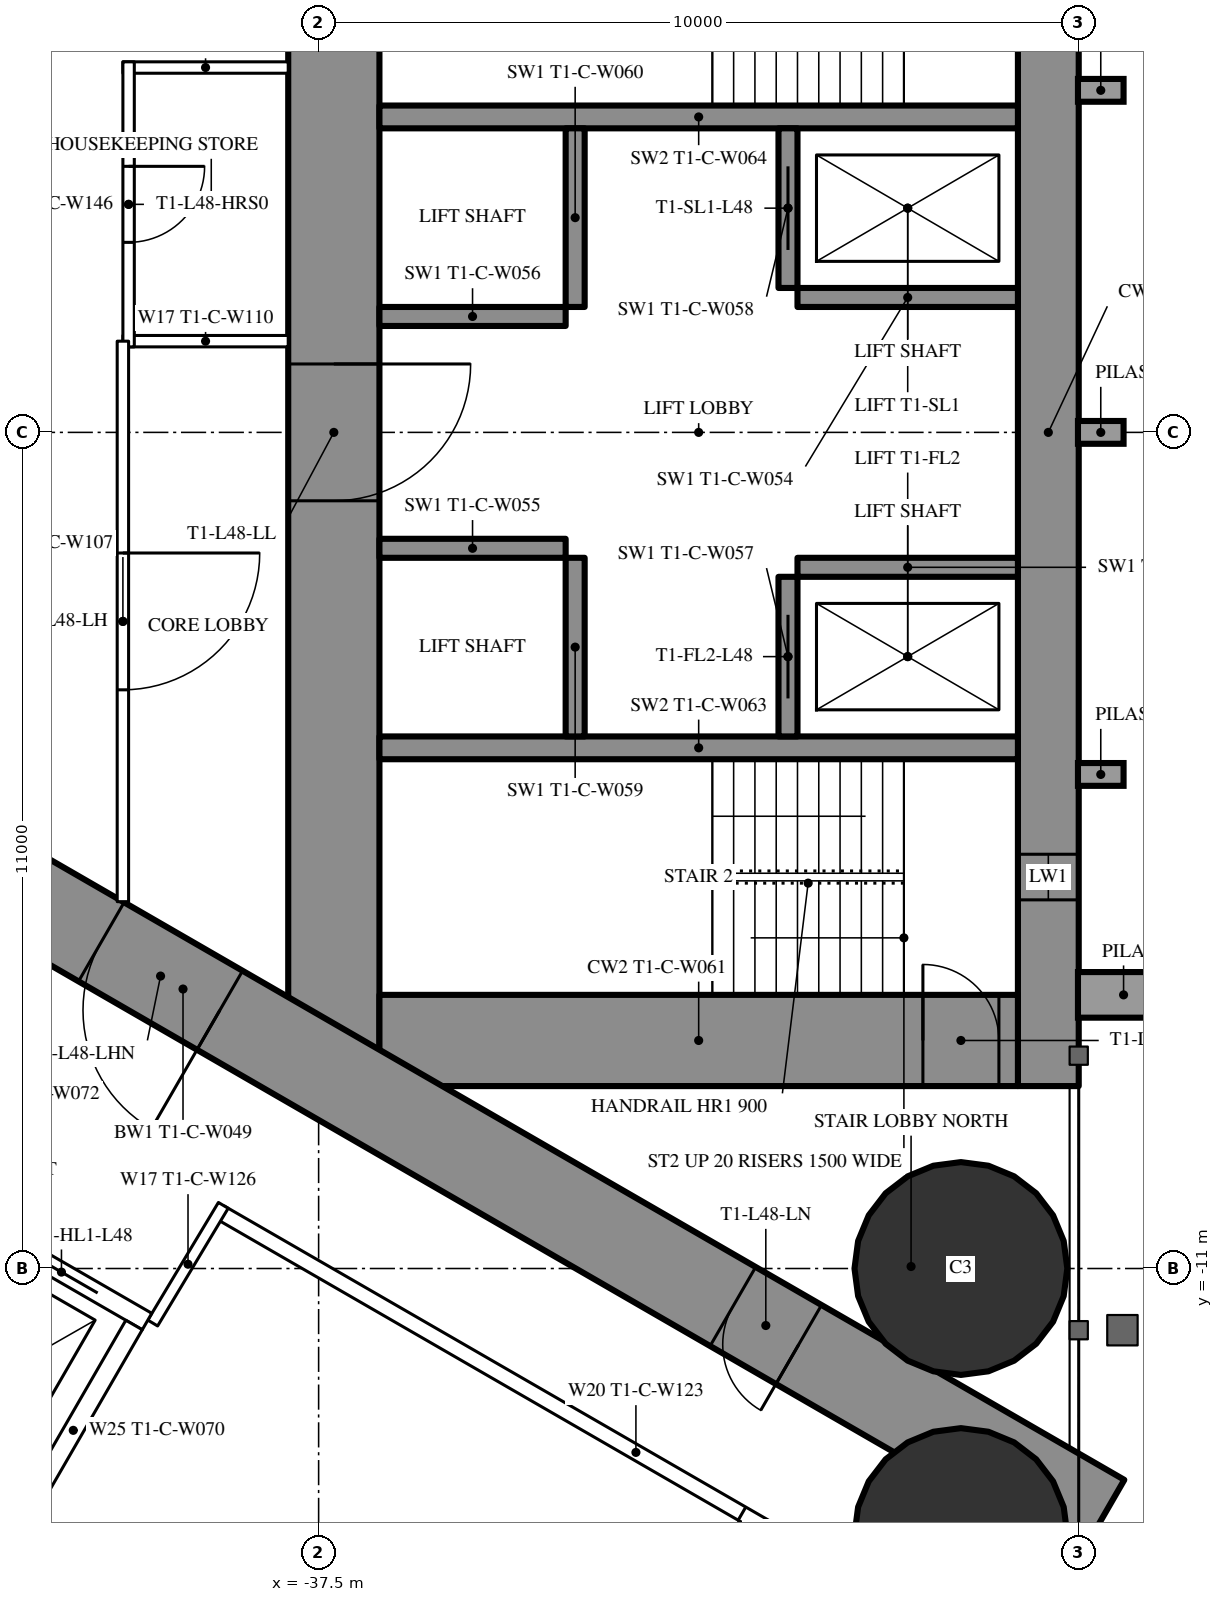
"""IFC4 building model, lengths in metres.
Left out: names, types, materials, properties, quantities, classifications, styles, units other than length and angle.
Written with IfcOpenShell. Run it as: python <this file> out.ifc"""

import sys

from ifc_helpers import new_model, si_unit, direction, frame, frame_2d, origin, origin_2d, place, context, subcontext, project, spatial, rectangle, circle, extrude, element, fill, save


model = new_model("IFC4")
c1 = context("Model", 3, precision=1e-05, world=origin(), true_north=direction((0.0, 1.0)))
c2 = subcontext(c1, "Body", "Model", "MODEL_VIEW")
j1 = project(units=[si_unit("LENGTHUNIT", "METRE"), si_unit("PLANEANGLEUNIT", "RADIAN")], contexts=[c1])
p1 = place(None, origin())
s1 = spatial("IfcSite", under=j1, at=p1, CompositionType="ELEMENT")
p2 = place(p1, origin())
s2 = spatial("IfcBuilding", under=s1, at=p2, CompositionType="ELEMENT")
p3 = place(p2, frame((0.0, 0.0, 180.8)))
s3 = spatial("IfcBuildingStorey", under=s2, at=p3, CompositionType="ELEMENT", Elevation=180.8)
for number, where, z_axis, x_axis in (
    (1, (-29.05, -11.0, 0.0), (0.0, 0.0, 1.0), (1.0, 0.0, 0.0)),
    (2, (-29.05, -14.5, 0.0), (0.0, 0.0, 1.0), (1.0, 0.0, 0.0)),
):
    element("IfcColumn", number, at=place(p3, frame(where, z_axis=z_axis, x_axis=x_axis)), inside=s3, PredefinedType="COLUMN", context=c2, shape_type="SweptSolid", body=[
        extrude(circle(Radius=1.4, at=origin_2d()), origin(), (0.0, 0.0, 1.0), 3.5),
    ])
p4 = place(p3, frame((-27.9, 8.6, 0.0), z_axis=(0.0, 0.0, 1.0), x_axis=(0.0, -1.0, 0.0)))
e3 = element("IfcWall", 3, at=p4, inside=s3, PredefinedType="SHEAR", context=c2, shape_type="SweptSolid", body=[
    extrude(rectangle(XDim=17.2, YDim=0.8, at=frame_2d((8.6, 0.0))), origin(), (0.0, 0.0, 1.0), 3.5),
])
p5 = place(p4, frame((2.45, 0.0, 0.6)))
e4 = element("IfcOpeningElement", 4, at=p5, cuts=e3, PredefinedType="OPENING", context=c2, shape_type="SweptSolid", body=[
    extrude(rectangle(XDim=0.6, YDim=2.1, at=frame_2d((0.3, 1.05))), frame((0.0, 0.41, 0.0), z_axis=(0.0, -1.0, 0.0), x_axis=(1.0, 0.0, 0.0)), (0.0, 0.0, 1.0), 0.82),
])
p6 = place(p4, frame((14.15, 0.0, 0.6)))
e5 = element("IfcOpeningElement", 5, at=p6, cuts=e3, PredefinedType="OPENING", context=c2, shape_type="SweptSolid", body=[
    extrude(rectangle(XDim=0.6, YDim=2.1, at=frame_2d((0.3, 1.05))), frame((0.0, 0.41, 0.0), z_axis=(0.0, -1.0, 0.0), x_axis=(1.0, 0.0, 0.0)), (0.0, 0.0, 1.0), 0.82),
])
p7 = place(p3, frame((-37.3, 8.6, 0.0), z_axis=(0.0, 0.0, 1.0), x_axis=(0.0, -1.0, 0.0)))
e6 = element("IfcWall", 6, at=p7, inside=s3, PredefinedType="SHEAR", context=c2, shape_type="SweptSolid", body=[
    extrude(rectangle(XDim=17.2, YDim=1.2, at=frame_2d((8.6, 0.0))), origin(), (0.0, 0.0, 1.0), 3.5),
])
p8 = place(p7, frame((7.7, 0.0, 0.0)))
e7 = element("IfcOpeningElement", 7, at=p8, cuts=e6, PredefinedType="OPENING", context=c2, shape_type="SweptSolid", body=[
    extrude(rectangle(XDim=1.8, YDim=2.2, at=frame_2d((0.9, 1.1))), frame((0.0, 0.61, 0.0), z_axis=(0.0, -1.0, 0.0), x_axis=(1.0, 0.0, 0.0)), (0.0, 0.0, 1.0), 1.22),
])
p9 = place(p3, frame((-28.3, -8.0, 0.0), z_axis=(0.0, 0.0, 1.0), x_axis=(-1.0, 0.0, 0.0)))
e8 = element("IfcWall", 8, at=p9, inside=s3, PredefinedType="SHEAR", context=c2, shape_type="SweptSolid", body=[
    extrude(rectangle(XDim=8.4, YDim=1.2, at=frame_2d((4.2, 0.0))), origin(), (0.0, 0.0, 1.0), 3.5),
])
p10 = place(p9, frame((0.25, 0.0, 0.0)))
e9 = element("IfcOpeningElement", 9, at=p10, cuts=e8, PredefinedType="OPENING", context=c2, shape_type="SweptSolid", body=[
    extrude(rectangle(XDim=1.0, YDim=2.2, at=frame_2d((0.5, 1.1))), frame((0.0, 0.61, 0.0), z_axis=(0.0, -1.0, 0.0), x_axis=(1.0, 0.0, 0.0)), (0.0, 0.0, 1.0), 1.22),
])
for number, where, z_axis, x_axis in (
    (10, (-28.3, 4.15, 0.0), (0.0, 0.0, 1.0), (-1.0, 0.0, 0.0)),
    (11, (-28.3, -4.15, 0.0), (0.0, 0.0, 1.0), (-1.0, 0.0, 0.0)),
):
    element("IfcWall", number, at=place(p3, frame(where, z_axis=z_axis, x_axis=x_axis)), inside=s3, PredefinedType="SHEAR", context=c2, shape_type="SweptSolid", body=[
        extrude(rectangle(XDim=8.4, YDim=0.3, at=frame_2d((4.2, 0.0))), origin(), (0.0, 0.0, 1.0), 3.5),
    ])
p11 = place(p3, frame((-31.325, 4.0, 0.0), z_axis=(0.0, 0.0, 1.0), x_axis=(0.0, -1.0, 0.0)))
e12 = element("IfcWall", 12, at=p11, inside=s3, PredefinedType="SHEAR", context=c2, shape_type="SweptSolid", body=[
    extrude(rectangle(XDim=2.1, YDim=0.25, at=frame_2d((1.05, 0.0))), origin(), (0.0, 0.0, 1.0), 3.5),
])
p12 = place(p11, frame((0.5, 0.0, 0.0)))
e13 = element("IfcOpeningElement", 13, at=p12, cuts=e12, PredefinedType="OPENING", context=c2, shape_type="SweptSolid", body=[
    extrude(rectangle(XDim=1.1, YDim=2.2, at=frame_2d((0.55, 1.1))), frame((0.0, 0.135, 0.0), z_axis=(0.0, -1.0, 0.0), x_axis=(1.0, 0.0, 0.0)), (0.0, 0.0, 1.0), 0.27),
])
p13 = place(p3, frame((-34.125, 4.0, 0.0), z_axis=(0.0, 0.0, 1.0), x_axis=(0.0, -1.0, 0.0)))
e14 = element("IfcWall", 14, at=p13, inside=s3, PredefinedType="SHEAR", context=c2, shape_type="SweptSolid", body=[
    extrude(rectangle(XDim=2.35, YDim=0.25, at=frame_2d((1.175, 0.0))), origin(), (0.0, 0.0, 1.0), 3.5),
])
p14 = place(p3, frame((-28.3, 1.775, 0.0), z_axis=(0.0, 0.0, 1.0), x_axis=(-1.0, 0.0, 0.0)))
e15 = element("IfcWall", 15, at=p14, inside=s3, PredefinedType="SHEAR", context=c2, shape_type="SweptSolid", body=[
    extrude(rectangle(XDim=2.9, YDim=0.25, at=frame_2d((1.45, 0.0))), origin(), (0.0, 0.0, 1.0), 3.5),
])
p15 = place(p3, frame((-34.25, 1.525, 0.0), z_axis=(0.0, 0.0, 1.0), x_axis=(-1.0, 0.0, 0.0)))
e16 = element("IfcWall", 16, at=p15, inside=s3, PredefinedType="SHEAR", context=c2, shape_type="SweptSolid", body=[
    extrude(rectangle(XDim=2.45, YDim=0.25, at=frame_2d((1.225, 0.0))), origin(), (0.0, 0.0, 1.0), 3.5),
])
p16 = place(p3, frame((-31.325, -1.9, 0.0), z_axis=(0.0, 0.0, 1.0), x_axis=(0.0, -1.0, 0.0)))
e17 = element("IfcWall", 17, at=p16, inside=s3, PredefinedType="SHEAR", context=c2, shape_type="SweptSolid", body=[
    extrude(rectangle(XDim=2.1, YDim=0.25, at=frame_2d((1.05, 0.0))), origin(), (0.0, 0.0, 1.0), 3.5),
])
p17 = place(p16, frame((0.5, 0.0, 0.0)))
e18 = element("IfcOpeningElement", 18, at=p17, cuts=e17, PredefinedType="OPENING", context=c2, shape_type="SweptSolid", body=[
    extrude(rectangle(XDim=1.1, YDim=2.2, at=frame_2d((0.55, 1.1))), frame((0.0, 0.135, 0.0), z_axis=(0.0, -1.0, 0.0), x_axis=(1.0, 0.0, 0.0)), (0.0, 0.0, 1.0), 0.27),
])
p18 = place(p3, frame((-34.125, -1.65, 0.0), z_axis=(0.0, 0.0, 1.0), x_axis=(0.0, -1.0, 0.0)))
e19 = element("IfcWall", 19, at=p18, inside=s3, PredefinedType="SHEAR", context=c2, shape_type="SweptSolid", body=[
    extrude(rectangle(XDim=2.35, YDim=0.25, at=frame_2d((1.175, 0.0))), origin(), (0.0, 0.0, 1.0), 3.5),
])
p19 = place(p3, frame((-28.3, -1.775, 0.0), z_axis=(0.0, 0.0, 1.0), x_axis=(-1.0, 0.0, 0.0)))
e20 = element("IfcWall", 20, at=p19, inside=s3, PredefinedType="SHEAR", context=c2, shape_type="SweptSolid", body=[
    extrude(rectangle(XDim=2.9, YDim=0.25, at=frame_2d((1.45, 0.0))), origin(), (0.0, 0.0, 1.0), 3.5),
])
p20 = place(p3, frame((-34.25, -1.525, 0.0), z_axis=(0.0, 0.0, 1.0), x_axis=(-1.0, 0.0, 0.0)))
e21 = element("IfcWall", 21, at=p20, inside=s3, PredefinedType="SHEAR", context=c2, shape_type="SweptSolid", body=[
    extrude(rectangle(XDim=2.45, YDim=0.25, at=frame_2d((1.225, 0.0))), origin(), (0.0, 0.0, 1.0), 3.5),
])
p21 = place(p3, frame((-27.2, 14.3, 0.0), z_axis=(0.0, 0.0, 1.0), x_axis=(-0.866026593062, -0.499997940104, 0.0)))
e22 = element("IfcWall", 22, at=p21, inside=s3, PredefinedType="SHEAR", context=c2, shape_type="SweptSolid", body=[
    extrude(rectangle(XDim=28.946, YDim=1.2, at=frame_2d((14.473, 0.0))), origin(), (0.0, 0.0, 1.0), 3.5),
])
p22 = place(p21, frame((4.6, 0.0, 0.0)))
e23 = element("IfcOpeningElement", 23, at=p22, cuts=e22, PredefinedType="OPENING", context=c2, shape_type="SweptSolid", body=[
    extrude(rectangle(XDim=1.0, YDim=2.2, at=frame_2d((0.5, 1.1))), frame((0.0, 0.61, 0.0), z_axis=(0.0, -1.0, 0.0), x_axis=(1.0, 0.0, 0.0)), (0.0, 0.0, 1.0), 1.22),
])
p23 = place(p21, frame((13.395, 0.0, 0.0)))
e24 = element("IfcOpeningElement", 24, at=p23, cuts=e22, PredefinedType="OPENING", context=c2, shape_type="SweptSolid", body=[
    extrude(rectangle(XDim=1.8, YDim=2.2, at=frame_2d((0.9, 1.1))), frame((0.0, 0.61, 0.0), z_axis=(0.0, -1.0, 0.0), x_axis=(1.0, 0.0, 0.0)), (0.0, 0.0, 1.0), 1.22),
])
p24 = place(p3, frame((-27.2, -14.3, 0.0), z_axis=(0.0, 0.0, 1.0), x_axis=(-0.866024021859, 0.500002393557, 0.0)))
e25 = element("IfcWall", 25, at=p24, inside=s3, PredefinedType="SHEAR", context=c2, shape_type="SweptSolid", body=[
    extrude(rectangle(XDim=27.907, YDim=1.2, at=frame_2d((13.954, 0.0))), origin(), (0.0, 0.0, 1.0), 3.5),
])
p25 = place(p24, frame((4.6, 0.0, 0.0)))
e26 = element("IfcOpeningElement", 26, at=p25, cuts=e25, PredefinedType="OPENING", context=c2, shape_type="SweptSolid", body=[
    extrude(rectangle(XDim=1.0, YDim=2.2, at=frame_2d((0.5, 1.1))), frame((0.0, 0.61, 0.0), z_axis=(0.0, -1.0, 0.0), x_axis=(1.0, 0.0, 0.0)), (0.0, 0.0, 1.0), 1.22),
])
p26 = place(p24, frame((13.395, 0.0, 0.0)))
e27 = element("IfcOpeningElement", 27, at=p26, cuts=e25, PredefinedType="OPENING", context=c2, shape_type="SweptSolid", body=[
    extrude(rectangle(XDim=1.8, YDim=2.2, at=frame_2d((0.9, 1.1))), frame((0.0, 0.61, 0.0), z_axis=(0.0, -1.0, 0.0), x_axis=(1.0, 0.0, 0.0)), (0.0, 0.0, 1.0), 1.22),
])
p27 = place(p3, frame((-27.86, -16.575, 0.0), z_axis=(0.0, 0.0, 1.0), x_axis=(-0.866027756871, 0.499995924312, 0.0)))
e28 = element("IfcWall", 28, at=p27, inside=s3, PredefinedType="PARTITIONING", context=c2, shape_type="SweptSolid", body=[
    extrude(rectangle(XDim=12.622, YDim=0.2, at=frame_2d((6.311, 0.0))), origin(), (0.0, 0.0, 1.0), 3.25),
])
p28 = place(p27, frame((3.75, 0.0, 0.0)))
e29 = element("IfcOpeningElement", 29, at=p28, cuts=e28, PredefinedType="OPENING", context=c2, shape_type="SweptSolid", body=[
    extrude(rectangle(XDim=0.95, YDim=2.2, at=frame_2d((0.475, 1.1))), frame((0.0, 0.11, 0.0), z_axis=(0.0, -1.0, 0.0), x_axis=(1.0, 0.0, 0.0)), (0.0, 0.0, 1.0), 0.22),
])
p29 = place(p3, frame((-39.683, -11.718, 0.0), z_axis=(0.0, 0.0, 1.0), x_axis=(0.514336634837, 0.857588377991, 0.0)))
e30 = element("IfcWall", 30, at=p29, inside=s3, PredefinedType="PARTITIONING", context=c2, shape_type="SweptSolid", body=[
    extrude(rectangle(XDim=1.805, YDim=0.15, at=frame_2d((0.903, 0.0))), origin(), (0.0, 0.0, 1.0), 3.25),
])
for number, where, z_axis, x_axis in (
    (31, (-37.9, 1.2, 0.0), (0.0, 0.0, 1.0), (-1.0, 0.0, 0.0)),
    (32, (-37.9, 4.8, 0.0), (0.0, 0.0, 1.0), (-1.0, 0.0, 0.0)),
):
    element("IfcWall", number, at=place(p3, frame(where, z_axis=z_axis, x_axis=x_axis)), inside=s3, PredefinedType="PARTITIONING", context=c2, shape_type="SweptSolid", body=[
        extrude(rectangle(XDim=2.175, YDim=0.15, at=frame_2d((1.087, 0.0))), origin(), (0.0, 0.0, 1.0), 3.25),
    ])
p30 = place(p3, frame((-40.0, 4.875, 0.0), z_axis=(0.0, 0.0, 1.0), x_axis=(0.0, -1.0, 0.0)))
e33 = element("IfcWall", 33, at=p30, inside=s3, PredefinedType="PARTITIONING", context=c2, shape_type="SweptSolid", body=[
    extrude(rectangle(XDim=3.75, YDim=0.15, at=frame_2d((1.875, 0.0))), origin(), (0.0, 0.0, 1.0), 3.25),
])
p31 = place(p30, frame((1.375, 0.0, 0.0)))
e34 = element("IfcOpeningElement", 34, at=p31, cuts=e33, PredefinedType="OPENING", context=c2, shape_type="SweptSolid", body=[
    extrude(rectangle(XDim=1.0, YDim=2.2, at=frame_2d((0.5, 1.1))), frame((0.0, 0.085, 0.0), z_axis=(0.0, -1.0, 0.0), x_axis=(1.0, 0.0, 0.0)), (0.0, 0.0, 1.0), 0.17),
])
p32 = place(p3, frame((-40.075, 1.2, 0.0), z_axis=(0.0, 0.0, 1.0), x_axis=(0.0, -1.0, 0.0)))
e35 = element("IfcWall", 35, at=p32, inside=s3, PredefinedType="PARTITIONING", context=c2, shape_type="SweptSolid", body=[
    extrude(rectangle(XDim=7.374, YDim=0.15, at=frame_2d((3.687, 0.0))), origin(), (0.0, 0.0, 1.0), 3.25),
])
p33 = place(p32, frame((2.787, 0.0, 0.0)))
e36 = element("IfcOpeningElement", 36, at=p33, cuts=e35, PredefinedType="OPENING", context=c2, shape_type="SweptSolid", body=[
    extrude(rectangle(XDim=1.8, YDim=2.2, at=frame_2d((0.9, 1.1))), frame((0.0, 0.085, 0.0), z_axis=(0.0, -1.0, 0.0), x_axis=(1.0, 0.0, 0.0)), (0.0, 0.0, 1.0), 0.17),
])
p34 = place(p3, frame((-39.758, -11.697, 0.0), z_axis=(0.0, 0.0, 1.0), x_axis=(-0.866024194504, 0.500002094529, 0.0)))
e37 = element("IfcWall", 37, at=p34, inside=s3, PredefinedType="PARTITIONING", context=c2, shape_type="SweptSolid", body=[
    extrude(rectangle(XDim=6.6, YDim=0.25, at=frame_2d((3.3, 0.0))), origin(), (0.0, 0.0, 1.0), 3.25),
])
p35 = place(p34, frame((0.75, 0.0, 0.0)))
e38 = element("IfcOpeningElement", 38, at=p35, cuts=e37, PredefinedType="OPENING", context=c2, shape_type="SweptSolid", body=[
    extrude(rectangle(XDim=1.1, YDim=2.2, at=frame_2d((0.55, 1.1))), frame((0.0, 0.135, 0.0), z_axis=(0.0, -1.0, 0.0), x_axis=(1.0, 0.0, 0.0)), (0.0, 0.0, 1.0), 0.27),
])
p36 = place(p34, frame((2.75, 0.0, 0.0)))
e39 = element("IfcOpeningElement", 39, at=p36, cuts=e37, PredefinedType="OPENING", context=c2, shape_type="SweptSolid", body=[
    extrude(rectangle(XDim=1.1, YDim=2.2, at=frame_2d((0.55, 1.1))), frame((0.0, 0.135, 0.0), z_axis=(0.0, -1.0, 0.0), x_axis=(1.0, 0.0, 0.0)), (0.0, 0.0, 1.0), 0.27),
])
p37 = place(p34, frame((4.75, 0.0, 0.0)))
e40 = element("IfcOpeningElement", 40, at=p37, cuts=e37, PredefinedType="OPENING", context=c2, shape_type="SweptSolid", body=[
    extrude(rectangle(XDim=1.1, YDim=2.2, at=frame_2d((0.55, 1.1))), frame((0.0, 0.135, 0.0), z_axis=(0.0, -1.0, 0.0), x_axis=(1.0, 0.0, 0.0)), (0.0, 0.0, 1.0), 0.27),
])
p38 = place(p3, frame((-39.928, -11.743, 0.0), z_axis=(0.0, 0.0, 1.0), x_axis=(-0.499929347863, -0.866066190972, 0.0)))
e41 = element("IfcWall", 41, at=p38, inside=s3, PredefinedType="PARTITIONING", context=c2, shape_type="SweptSolid", body=[
    extrude(rectangle(XDim=3.201, YDim=0.25, at=frame_2d((1.6, 0.0))), origin(), (0.0, 0.0, 1.0), 3.25),
])
p39 = place(p28, origin())
e42 = element("IfcDoor", 42, at=p39, inside=s3, OperationType="SINGLE_SWING_LEFT", PredefinedType="DOOR", context=c2, shape_type="SweptSolid", body=[
    extrude(rectangle(XDim=0.95, YDim=2.2, at=frame_2d((0.475, 1.1))), frame((0.0, 0.025, 0.0), z_axis=(0.0, -1.0, 0.0), x_axis=(1.0, 0.0, 0.0)), (0.0, 0.0, 1.0), 0.05),
])
fill(e29, e42)
p40 = place(p31, origin())
e43 = element("IfcDoor", 43, at=p40, inside=s3, OperationType="SINGLE_SWING_LEFT", PredefinedType="DOOR", context=c2, shape_type="SweptSolid", body=[
    extrude(rectangle(XDim=1.0, YDim=2.2, at=frame_2d((0.5, 1.1))), frame((0.0, 0.025, 0.0), z_axis=(0.0, -1.0, 0.0), x_axis=(1.0, 0.0, 0.0)), (0.0, 0.0, 1.0), 0.05),
])
fill(e34, e43)
p41 = place(p33, origin())
e44 = element("IfcDoor", 44, at=p41, inside=s3, OperationType="DOUBLE_DOOR_SINGLE_SWING", PredefinedType="DOOR", context=c2, shape_type="SweptSolid", body=[
    extrude(rectangle(XDim=1.8, YDim=2.2, at=frame_2d((0.9, 1.1))), frame((0.0, 0.025, 0.0), z_axis=(0.0, -1.0, 0.0), x_axis=(1.0, 0.0, 0.0)), (0.0, 0.0, 1.0), 0.05),
])
fill(e36, e44)
p42 = place(p25, origin())
e45 = element("IfcDoor", 45, at=p42, inside=s3, OperationType="SINGLE_SWING_LEFT", PredefinedType="DOOR", context=c2, shape_type="SweptSolid", body=[
    extrude(rectangle(XDim=1.0, YDim=2.2, at=frame_2d((0.5, 1.1))), frame((0.0, 0.025, 0.0), z_axis=(0.0, -1.0, 0.0), x_axis=(1.0, 0.0, 0.0)), (0.0, 0.0, 1.0), 0.05),
])
fill(e26, e45)
p43 = place(p26, origin())
e46 = element("IfcDoor", 46, at=p43, inside=s3, OperationType="DOUBLE_DOOR_SINGLE_SWING", PredefinedType="DOOR", context=c2, shape_type="SweptSolid", body=[
    extrude(rectangle(XDim=1.8, YDim=2.2, at=frame_2d((0.9, 1.1))), frame((0.0, 0.025, 0.0), z_axis=(0.0, -1.0, 0.0), x_axis=(1.0, 0.0, 0.0)), (0.0, 0.0, 1.0), 0.05),
])
fill(e27, e46)
p44 = place(p8, origin())
e47 = element("IfcDoor", 47, at=p44, inside=s3, OperationType="DOUBLE_DOOR_SINGLE_SWING", PredefinedType="DOOR", context=c2, shape_type="SweptSolid", body=[
    extrude(rectangle(XDim=1.8, YDim=2.2, at=frame_2d((0.9, 1.1))), frame((0.0, 0.025, 0.0), z_axis=(0.0, -1.0, 0.0), x_axis=(1.0, 0.0, 0.0)), (0.0, 0.0, 1.0), 0.05),
])
fill(e7, e47)
p45 = place(p10, origin())
e48 = element("IfcDoor", 48, at=p45, inside=s3, OperationType="SINGLE_SWING_RIGHT", PredefinedType="DOOR", context=c2, shape_type="SweptSolid", body=[
    extrude(rectangle(XDim=1.0, YDim=2.2, at=frame_2d((0.5, 1.1))), frame((0.0, 0.025, 0.0), z_axis=(0.0, -1.0, 0.0), x_axis=(1.0, 0.0, 0.0)), (0.0, 0.0, 1.0), 0.05),
])
fill(e9, e48)
p46 = place(p12, origin())
e49 = element("IfcDoor", 49, at=p46, inside=s3, OperationType="SLIDING_TO_LEFT", PredefinedType="USERDEFINED", context=c2, shape_type="SweptSolid", body=[
    extrude(rectangle(XDim=1.1, YDim=2.2, at=frame_2d((0.55, 1.1))), frame((0.0, 0.025, 0.0), z_axis=(0.0, -1.0, 0.0), x_axis=(1.0, 0.0, 0.0)), (0.0, 0.0, 1.0), 0.05),
])
fill(e13, e49)
p47 = place(p17, origin())
e50 = element("IfcDoor", 50, at=p47, inside=s3, OperationType="SLIDING_TO_LEFT", PredefinedType="USERDEFINED", context=c2, shape_type="SweptSolid", body=[
    extrude(rectangle(XDim=1.1, YDim=2.2, at=frame_2d((0.55, 1.1))), frame((0.0, 0.025, 0.0), z_axis=(0.0, -1.0, 0.0), x_axis=(1.0, 0.0, 0.0)), (0.0, 0.0, 1.0), 0.05),
])
fill(e18, e50)
p48 = place(p35, origin())
e51 = element("IfcDoor", 51, at=p48, inside=s3, OperationType="DOUBLE_DOOR_SLIDING", PredefinedType="USERDEFINED", context=c2, shape_type="SweptSolid", body=[
    extrude(rectangle(XDim=1.1, YDim=2.2, at=frame_2d((0.55, 1.1))), frame((0.0, 0.025, 0.0), z_axis=(0.0, -1.0, 0.0), x_axis=(1.0, 0.0, 0.0)), (0.0, 0.0, 1.0), 0.05),
])
fill(e38, e51)
p49 = place(p6, origin())
e52 = element("IfcWindow", 52, at=p49, inside=s3, PartitioningType="SINGLE_PANEL", PredefinedType="WINDOW", context=c2, shape_type="SweptSolid", body=[
    extrude(rectangle(XDim=0.6, YDim=2.1, at=frame_2d((0.3, 1.05))), frame((0.0, 0.03, 0.0), z_axis=(0.0, -1.0, 0.0), x_axis=(1.0, 0.0, 0.0)), (0.0, 0.0, 1.0), 0.06),
])
fill(e5, e52)
save(model, sys.argv[1])
